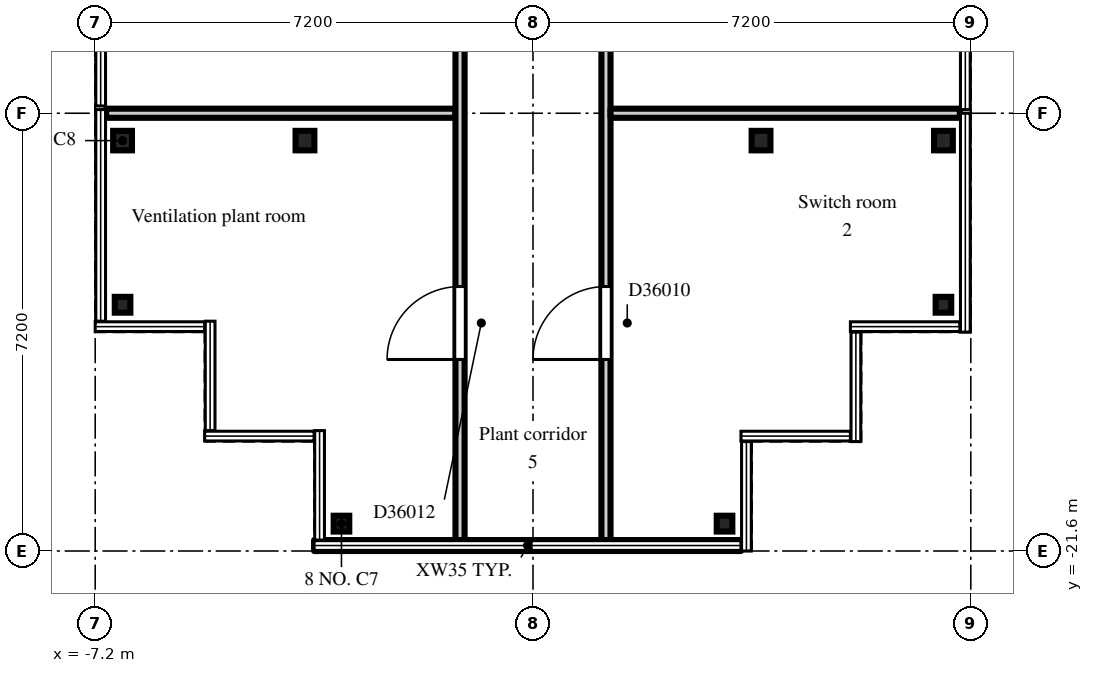
"""IFC4 building model, lengths in metres.
Left out: names, types, materials, properties, quantities, classifications, styles, units other than length and angle.
Written with IfcOpenShell. Run it as: python <this file> out.ifc"""

import sys

from ifc_helpers import new_model, si_unit, direction, frame, frame_2d, origin, origin_2d, place, context, subcontext, project, spatial, rectangle, i_section, extrude, element, fill, save


model = new_model("IFC4")
c1 = context("Model", 3, precision=1e-05, world=origin(), true_north=direction((0.0, 1.0)))
c2 = subcontext(c1, "Body", "Model", "MODEL_VIEW")
j1 = project(units=[si_unit("LENGTHUNIT", "METRE"), si_unit("PLANEANGLEUNIT", "RADIAN")], contexts=[c1])
p1 = place(None, origin())
s1 = spatial("IfcSite", under=j1, at=p1, CompositionType="ELEMENT")
p2 = place(p1, origin())
s2 = spatial("IfcBuilding", under=s1, at=p2, CompositionType="ELEMENT")
p3 = place(p2, frame((0.0, 0.0, 247.5)))
s3 = spatial("IfcBuildingStorey", under=s2, at=p3, CompositionType="ELEMENT", Elevation=247.5)
p4 = place(p3, frame((-6.75, -17.55, 0.0), z_axis=(0.0, 0.0, 1.0), x_axis=(1.0, 0.0, 0.0)))
e1 = element("IfcColumn", 1, at=p4, inside=s3, PredefinedType="COLUMN", context=c2, shape_type="SweptSolid", body=[
    extrude(i_section(OverallWidth=0.256, OverallDepth=0.26, WebThickness=0.01, FlangeThickness=0.017, FilletRadius=0.013, at=origin_2d()), origin(), (0.0, 0.0, 1.0), 4.087),
])
p5 = place(p3, frame((-6.75, -14.85, 0.0), z_axis=(0.0, 0.0, 1.0), x_axis=(1.0, 0.0, 0.0)))
e2 = element("IfcColumn", 2, at=p5, inside=s3, PredefinedType="COLUMN", context=c2, shape_type="SweptSolid", body=[
    extrude(i_section(OverallWidth=0.309, OverallDepth=0.321, WebThickness=0.014, FlangeThickness=0.022, FilletRadius=0.015, at=origin_2d()), origin(), (0.0, 0.0, 1.0), 5.462),
])
p6 = place(p3, frame((-3.75, -14.85, 0.0), z_axis=(0.0, 0.0, 1.0), x_axis=(1.0, 0.0, 0.0)))
e3 = element("IfcColumn", 3, at=p6, inside=s3, PredefinedType="COLUMN", context=c2, shape_type="SweptSolid", body=[
    extrude(i_section(OverallWidth=0.309, OverallDepth=0.321, WebThickness=0.014, FlangeThickness=0.022, FilletRadius=0.015, at=origin_2d()), origin(), (0.0, 0.0, 1.0), 5.538),
])
for number, where, z_axis, x_axis in (
    (4, (-3.15, -21.15, 0.0), (0.0, 0.0, 1.0), (1.0, 0.0, 0.0)),
    (5, (3.15, -21.15, 0.0), (0.0, 0.0, 1.0), (1.0, 0.0, 0.0)),
):
    element("IfcColumn", number, at=place(p3, frame(where, z_axis=z_axis, x_axis=x_axis)), inside=s3, PredefinedType="COLUMN", context=c2, shape_type="SweptSolid", body=[
        extrude(i_section(OverallWidth=0.256, OverallDepth=0.26, WebThickness=0.01, FlangeThickness=0.017, FilletRadius=0.013, at=origin_2d()), origin(), (0.0, 0.0, 1.0), 2.479),
    ])
p7 = place(p3, frame((3.75, -14.85, 0.0), z_axis=(0.0, 0.0, 1.0), x_axis=(1.0, 0.0, 0.0)))
e6 = element("IfcColumn", 6, at=p7, inside=s3, PredefinedType="COLUMN", context=c2, shape_type="SweptSolid", body=[
    extrude(i_section(OverallWidth=0.309, OverallDepth=0.321, WebThickness=0.014, FlangeThickness=0.022, FilletRadius=0.015, at=origin_2d()), origin(), (0.0, 0.0, 1.0), 5.538),
])
p8 = place(p3, frame((6.75, -17.55, 0.0), z_axis=(0.0, 0.0, 1.0), x_axis=(1.0, 0.0, 0.0)))
e7 = element("IfcColumn", 7, at=p8, inside=s3, PredefinedType="COLUMN", context=c2, shape_type="SweptSolid", body=[
    extrude(i_section(OverallWidth=0.256, OverallDepth=0.26, WebThickness=0.01, FlangeThickness=0.017, FilletRadius=0.013, at=origin_2d()), origin(), (0.0, 0.0, 1.0), 4.087),
])
p9 = place(p3, frame((6.75, -14.85, 0.0), z_axis=(0.0, 0.0, 1.0), x_axis=(1.0, 0.0, 0.0)))
e8 = element("IfcColumn", 8, at=p9, inside=s3, PredefinedType="COLUMN", context=c2, shape_type="SweptSolid", body=[
    extrude(i_section(OverallWidth=0.309, OverallDepth=0.321, WebThickness=0.014, FlangeThickness=0.022, FilletRadius=0.015, at=origin_2d()), origin(), (0.0, 0.0, 1.0), 5.462),
])
p10 = place(p3, frame((-3.6, -21.51, 3.127), z_axis=(0.0, 0.0, 1.0), x_axis=(1.0, 0.0, 0.0)))
e9 = element("IfcWall", 9, at=p10, inside=s3, PredefinedType="PARAPET", context=c2, shape_type="SweptSolid", body=[
    extrude(rectangle(XDim=7.02, YDim=0.18, at=frame_2d((3.51, 0.0))), origin(), (0.0, 0.0, 1.0), 1.1),
])
p11 = place(p3, frame((-7.02, -14.4, 0.0), z_axis=(0.0, 0.0, 1.0), x_axis=(1.0, 0.0, 0.0)))
e10 = element("IfcWall", 10, at=p11, inside=s3, PredefinedType="PARTITIONING", context=c2, shape_type="SweptSolid", body=[
    extrude(rectangle(XDim=5.745, YDim=0.15, at=frame_2d((2.873, 0.0))), origin(), (0.0, 0.0, 1.0), 2.7),
])
p12 = place(p3, frame((-1.2, -21.42, 0.0), z_axis=(0.0, 0.0, 1.0), x_axis=(0.0, 1.0, 0.0)))
e11 = element("IfcWall", 11, at=p12, inside=s3, PredefinedType="PARTITIONING", context=c2, shape_type="SweptSolid", body=[
    extrude(rectangle(XDim=20.295, YDim=0.15, at=frame_2d((10.147, 0.0))), origin(), (0.0, 0.0, 1.0), 2.7),
])
p13 = place(p12, frame((10.02, 0.0, 0.0)))
e12 = element("IfcOpeningElement", 12, at=p13, cuts=e11, PredefinedType="OPENING", context=c2, shape_type="SweptSolid", body=[
    extrude(rectangle(XDim=1.2, YDim=2.1, at=frame_2d((0.6, 1.05))), frame((0.0, 0.085, 0.0), z_axis=(0.0, -1.0, 0.0), x_axis=(1.0, 0.0, 0.0)), (0.0, 0.0, 1.0), 0.17),
])
p14 = place(p12, frame((2.97, 0.0, 0.0)))
e13 = element("IfcOpeningElement", 13, at=p14, cuts=e11, PredefinedType="OPENING", context=c2, shape_type="SweptSolid", body=[
    extrude(rectangle(XDim=1.2, YDim=2.1, at=frame_2d((0.6, 1.05))), frame((0.0, 0.085, 0.0), z_axis=(0.0, -1.0, 0.0), x_axis=(1.0, 0.0, 0.0)), (0.0, 0.0, 1.0), 0.17),
])
p15 = place(p3, frame((1.2, -21.42, 0.0), z_axis=(0.0, 0.0, 1.0), x_axis=(0.0, 1.0, 0.0)))
e14 = element("IfcWall", 14, at=p15, inside=s3, PredefinedType="PARTITIONING", context=c2, shape_type="SweptSolid", body=[
    extrude(rectangle(XDim=20.295, YDim=0.15, at=frame_2d((10.147, 0.0))), origin(), (0.0, 0.0, 1.0), 2.7),
])
p16 = place(p15, frame((18.92, 0.0, 0.0)))
e15 = element("IfcOpeningElement", 15, at=p16, cuts=e14, PredefinedType="OPENING", context=c2, shape_type="SweptSolid", body=[
    extrude(rectangle(XDim=1.2, YDim=2.1, at=frame_2d((0.6, 1.05))), frame((0.0, 0.085, 0.0), z_axis=(0.0, -1.0, 0.0), x_axis=(1.0, 0.0, 0.0)), (0.0, 0.0, 1.0), 0.17),
])
p17 = place(p15, frame((10.02, 0.0, 0.0)))
e16 = element("IfcOpeningElement", 16, at=p17, cuts=e14, PredefinedType="OPENING", context=c2, shape_type="SweptSolid", body=[
    extrude(rectangle(XDim=1.2, YDim=2.1, at=frame_2d((0.6, 1.05))), frame((0.0, 0.085, 0.0), z_axis=(0.0, -1.0, 0.0), x_axis=(1.0, 0.0, 0.0)), (0.0, 0.0, 1.0), 0.17),
])
p18 = place(p15, frame((2.97, 0.0, 0.0)))
e17 = element("IfcOpeningElement", 17, at=p18, cuts=e14, PredefinedType="OPENING", context=c2, shape_type="SweptSolid", body=[
    extrude(rectangle(XDim=1.2, YDim=2.1, at=frame_2d((0.6, 1.05))), frame((0.0, 0.085, 0.0), z_axis=(0.0, -1.0, 0.0), x_axis=(1.0, 0.0, 0.0)), (0.0, 0.0, 1.0), 0.17),
])
p19 = place(p3, frame((1.275, -14.4, 0.0), z_axis=(0.0, 0.0, 1.0), x_axis=(1.0, 0.0, 0.0)))
e18 = element("IfcWall", 18, at=p19, inside=s3, PredefinedType="PARTITIONING", context=c2, shape_type="SweptSolid", body=[
    extrude(rectangle(XDim=5.745, YDim=0.15, at=frame_2d((2.873, 0.0))), origin(), (0.0, 0.0, 1.0), 2.7),
])
p20 = place(p18, origin())
e19 = element("IfcDoor", 19, at=p20, inside=s3, OperationType="SINGLE_SWING_LEFT", PredefinedType="DOOR", context=c2, shape_type="SweptSolid", body=[
    extrude(rectangle(XDim=1.2, YDim=2.1, at=frame_2d((0.6, 1.05))), frame((0.0, 0.025, 0.0), z_axis=(0.0, -1.0, 0.0), x_axis=(1.0, 0.0, 0.0)), (0.0, 0.0, 1.0), 0.05),
])
fill(e17, e19)
p21 = place(p14, origin())
e20 = element("IfcDoor", 20, at=p21, inside=s3, OperationType="SINGLE_SWING_LEFT", PredefinedType="DOOR", context=c2, shape_type="SweptSolid", body=[
    extrude(rectangle(XDim=1.2, YDim=2.1, at=frame_2d((0.6, 1.05))), frame((0.0, 0.025, 0.0), z_axis=(0.0, -1.0, 0.0), x_axis=(1.0, 0.0, 0.0)), (0.0, 0.0, 1.0), 0.05),
])
fill(e13, e20)
save(model, sys.argv[1])
